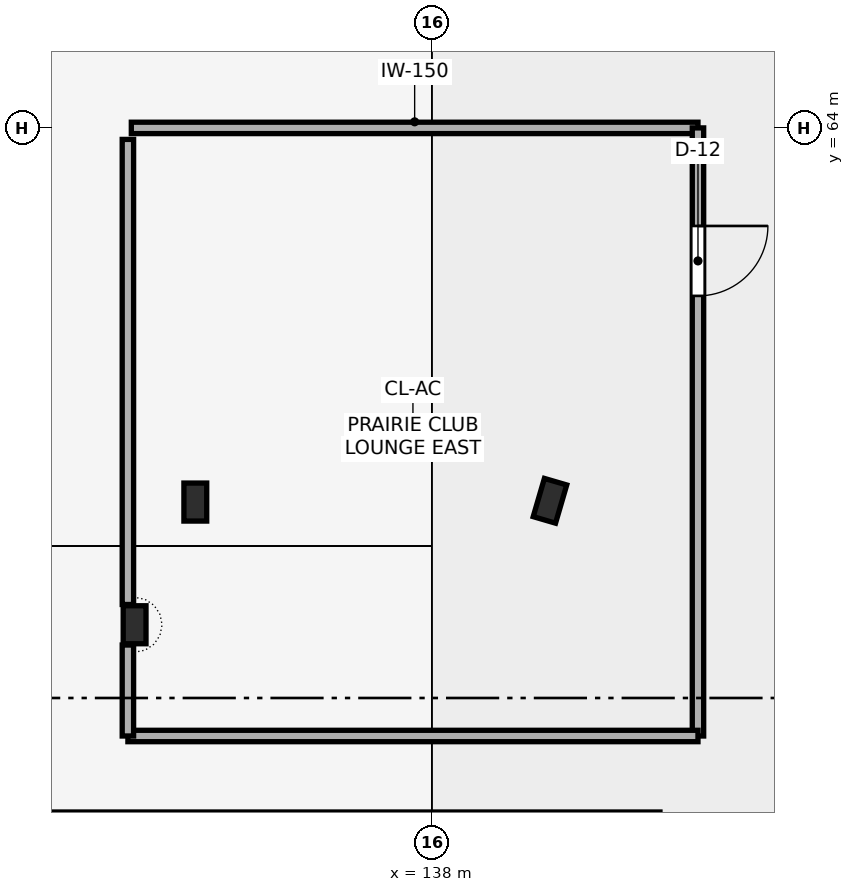
"""IFC4 building model, lengths in metres.
Left out: names, types, materials, properties, quantities, classifications, styles, units other than length and angle.
Written with IfcOpenShell. Run it as: python <this file> out.ifc"""

import sys

from ifc_helpers import new_model, si_unit, direction, frame, frame_2d, origin, origin_2d, place, context, subcontext, project, spatial, rectangle, i_section, extrude, element, fill, save


model = new_model("IFC4")
c1 = context("Model", 3, precision=1e-05, world=origin(), true_north=direction((0.0, 1.0)))
c2 = subcontext(c1, "Body", "Model", "MODEL_VIEW")
j1 = project(units=[si_unit("LENGTHUNIT", "METRE"), si_unit("PLANEANGLEUNIT", "RADIAN")], contexts=[c1])
p1 = place(None, origin())
s1 = spatial("IfcSite", under=j1, at=p1, CompositionType="ELEMENT")
p2 = place(p1, origin())
s2 = spatial("IfcBuilding", under=s1, at=p2, CompositionType="ELEMENT")
p3 = place(p2, frame((0.0, 0.0, 10.2)))
s3 = spatial("IfcBuildingStorey", under=s2, at=p3, CompositionType="ELEMENT", Elevation=10.2)
p4 = place(p3, frame((139.553, 59.094, 0.0), z_axis=(0.0, 0.0, 1.0), x_axis=(0.959805291975, -0.280666708921, 0.0)))
e1 = element("IfcColumn", 1, at=p4, inside=s3, PredefinedType="COLUMN", context=c2, shape_type="SweptSolid", body=[
    extrude(i_section(OverallWidth=0.306, OverallDepth=0.524, WebThickness=0.021, FlangeThickness=0.04, FilletRadius=0.027, at=origin_2d()), origin(), (0.0, 0.0, 1.0), 4.8),
])
for number, where, z_axis, x_axis in (
    (2, (134.088, 57.463, 0.0), (0.0, 0.0, 1.0), (1.0, 0.0, 0.0)),
    (3, (134.887, 59.077, 0.0), (0.0, 0.0, 1.0), (1.0, 0.0, 0.0)),
):
    element("IfcColumn", number, at=place(p3, frame(where, z_axis=z_axis, x_axis=x_axis)), inside=s3, PredefinedType="COLUMN", context=c2, shape_type="SweptSolid", body=[
        extrude(i_section(OverallWidth=0.3, OverallDepth=0.5, WebThickness=0.014, FlangeThickness=0.028, FilletRadius=0.027, at=origin_2d()), origin(), (0.0, 0.0, 1.0), 4.8),
    ])
p5 = place(p3, frame((134.045, 64.0, 0.0), z_axis=(0.0, 0.0, 1.0), x_axis=(1.0, 0.0, 0.0)))
e4 = element("IfcWall", 4, at=p5, inside=s3, PredefinedType="PARTITIONING", context=c2, shape_type="SweptSolid", body=[
    extrude(rectangle(XDim=7.455, YDim=0.15, at=frame_2d((3.728, 0.0))), origin(), (0.0, 0.0, 1.0), 4.52),
])
p6 = place(p3, frame((141.5, 64.0, 0.0), z_axis=(0.0, 0.0, 1.0), x_axis=(0.0, -1.0, 0.0)))
e5 = element("IfcWall", 5, at=p6, inside=s3, PredefinedType="PARTITIONING", context=c2, shape_type="SweptSolid", body=[
    extrude(rectangle(XDim=8.0, YDim=0.15, at=frame_2d((4.0, 0.0))), origin(), (0.0, 0.0, 1.0), 4.52),
])
p7 = place(p6, frame((1.29, 0.0, 0.0)))
e6 = element("IfcOpeningElement", 6, at=p7, cuts=e5, PredefinedType="OPENING", context=c2, shape_type="SweptSolid", body=[
    extrude(rectangle(XDim=0.92, YDim=2.15, at=frame_2d((0.46, 1.075))), frame((0.0, 0.085, 0.0), z_axis=(0.0, -1.0, 0.0), x_axis=(1.0, 0.0, 0.0)), (0.0, 0.0, 1.0), 0.17),
])
p8 = place(p3, frame((141.5, 56.0, 0.0), z_axis=(0.0, 0.0, 1.0), x_axis=(-1.0, 0.0, 0.0)))
e7 = element("IfcWall", 7, at=p8, inside=s3, PredefinedType="PARTITIONING", context=c2, shape_type="SweptSolid", body=[
    extrude(rectangle(XDim=7.5, YDim=0.15, at=frame_2d((3.75, 0.0))), origin(), (0.0, 0.0, 1.0), 4.52),
])
p9 = place(p3, frame((134.0, 56.0, 0.0), z_axis=(0.0, 0.0, 1.0), x_axis=(0.0, 1.0, 0.0)))
e8 = element("IfcWall", 8, at=p9, inside=s3, PredefinedType="PARTITIONING", context=c2, shape_type="SweptSolid", body=[
    extrude(rectangle(XDim=1.197, YDim=0.15, at=frame_2d((0.599, 0.0))), origin(), (0.0, 0.0, 1.0), 4.52),
])
p10 = place(p3, frame((134.0, 57.73, 0.0), z_axis=(0.0, 0.0, 1.0), x_axis=(0.0, 1.0, 0.0)))
e9 = element("IfcWall", 9, at=p10, inside=s3, PredefinedType="PARTITIONING", context=c2, shape_type="SweptSolid", body=[
    extrude(rectangle(XDim=6.119, YDim=0.15, at=frame_2d((3.059, 0.0))), origin(), (0.0, 0.0, 1.0), 4.52),
])
p11 = place(p7, origin())
e10 = element("IfcDoor", 10, at=p11, inside=s3, OperationType="SINGLE_SWING_LEFT", PredefinedType="DOOR", context=c2, shape_type="SweptSolid", body=[
    extrude(rectangle(XDim=0.92, YDim=2.15, at=frame_2d((0.46, 1.075))), frame((0.0, 0.025, 0.0), z_axis=(0.0, -1.0, 0.0), x_axis=(1.0, 0.0, 0.0)), (0.0, 0.0, 1.0), 0.05),
])
fill(e6, e10)
save(model, sys.argv[1])
